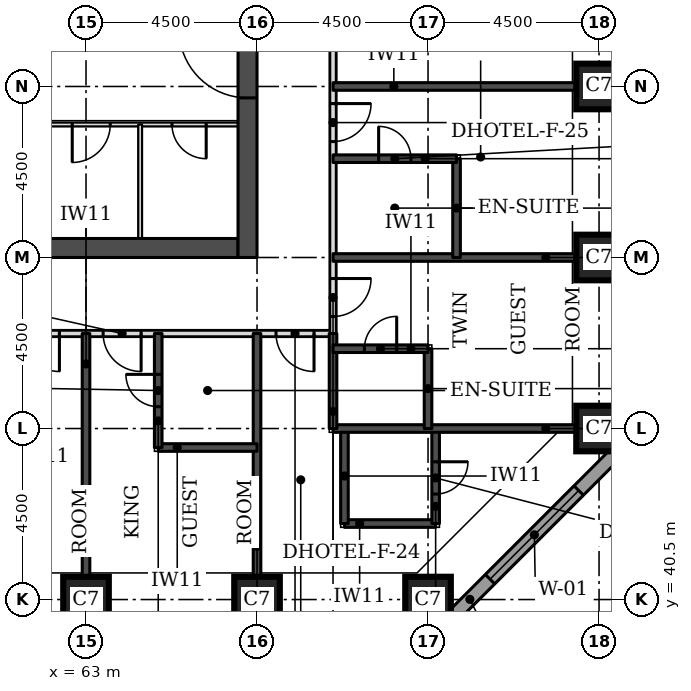
"""IFC4 building model, lengths in metres.
Left out: names, types, materials, properties, quantities, classifications, styles, units other than length and angle.
Written with IfcOpenShell. Run it as: python <this file> out.ifc"""

import sys

from ifc_helpers import new_model, si_unit, direction, frame, frame_2d, origin, origin_2d, place, context, subcontext, project, spatial, rectangle, extrude, element, fill, save


model = new_model("IFC4")
c1 = context("Model", 3, precision=1e-05, world=origin(), true_north=direction((0.0, 1.0)))
c2 = subcontext(c1, "Body", "Model", "MODEL_VIEW")
j1 = project(units=[si_unit("LENGTHUNIT", "METRE"), si_unit("PLANEANGLEUNIT", "RADIAN")], contexts=[c1])
p1 = place(None, origin())
s1 = spatial("IfcSite", under=j1, at=p1, CompositionType="ELEMENT")
p2 = place(p1, origin())
s2 = spatial("IfcBuilding", under=s1, at=p2, CompositionType="ELEMENT")
p3 = place(p2, frame((0.0, 0.0, 42.9)))
s3 = spatial("IfcBuildingStorey", under=s2, at=p3, CompositionType="ELEMENT", Elevation=42.9)
for number, where, z_axis, x_axis in (
    (1, (63.0, 40.5, 0.0), (0.0, 0.0, 1.0), (1.0, 0.0, 0.0)),
    (2, (67.5, 40.5, 0.0), (0.0, 0.0, 1.0), (1.0, 0.0, 0.0)),
    (3, (72.0, 40.5, 0.0), (0.0, 0.0, 1.0), (1.0, 0.0, 0.0)),
    (4, (76.5, 45.0, 0.0), (0.0, 0.0, 1.0), (1.0, 0.0, 0.0)),
    (5, (76.5, 49.5, 0.0), (0.0, 0.0, 1.0), (1.0, 0.0, 0.0)),
    (6, (76.5, 54.0, 0.0), (0.0, 0.0, 1.0), (1.0, 0.0, 0.0)),
):
    element("IfcColumn", number, at=place(p3, frame(where, z_axis=z_axis, x_axis=x_axis)), inside=s3, PredefinedType="COLUMN", context=c2, shape_type="SweptSolid", body=[
        extrude(rectangle(XDim=1.2, YDim=1.2, at=origin_2d()), origin(), (0.0, 0.0, 1.0), 3.3),
    ])
p4 = place(p3, frame((45.5, 49.75, 0.0), z_axis=(0.0, 0.0, 1.0), x_axis=(1.0, 0.0, 0.0)))
e7 = element("IfcWall", 7, at=p4, inside=s3, PredefinedType="SHEAR", context=c2, shape_type="SweptSolid", body=[
    extrude(rectangle(XDim=21.5, YDim=0.5, at=frame_2d((10.75, 0.0))), origin(), (0.0, 0.0, 1.0), 3.3),
])
p5 = place(p3, frame((67.25, 49.5, 0.0), z_axis=(0.0, 0.0, 1.0), x_axis=(0.0, 1.0, 0.0)))
e8 = element("IfcWall", 8, at=p5, inside=s3, PredefinedType="SHEAR", context=c2, shape_type="SweptSolid", body=[
    extrude(rectangle(XDim=22.5, YDim=0.5, at=frame_2d((11.25, 0.0))), origin(), (0.0, 0.0, 1.0), 3.3),
])
p6 = place(p5, frame((4.2, 0.0, 0.0)))
e9 = element("IfcOpeningElement", 9, at=p6, cuts=e8, PredefinedType="OPENING", context=c2, shape_type="SweptSolid", body=[
    extrude(rectangle(XDim=1.8, YDim=2.1, at=frame_2d((0.9, 1.05))), frame((0.0, 0.26, 0.0), z_axis=(0.0, -1.0, 0.0), x_axis=(1.0, 0.0, 0.0)), (0.0, 0.0, 1.0), 0.52),
])
p7 = place(p5, frame((6.9, 0.0, 0.0)))
e10 = element("IfcOpeningElement", 10, at=p7, cuts=e8, PredefinedType="OPENING", context=c2, shape_type="SweptSolid", body=[
    extrude(rectangle(XDim=1.1, YDim=2.1, at=frame_2d((0.55, 1.05))), frame((0.0, 0.26, 0.0), z_axis=(0.0, -1.0, 0.0), x_axis=(1.0, 0.0, 0.0)), (0.0, 0.0, 1.0), 0.52),
])
p8 = place(p5, frame((13.6, 0.0, 0.0)))
e11 = element("IfcOpeningElement", 11, at=p8, cuts=e8, PredefinedType="OPENING", context=c2, shape_type="SweptSolid", body=[
    extrude(rectangle(XDim=1.1, YDim=2.1, at=frame_2d((0.55, 1.05))), frame((0.0, 0.26, 0.0), z_axis=(0.0, -1.0, 0.0), x_axis=(1.0, 0.0, 0.0)), (0.0, 0.0, 1.0), 0.52),
])
p9 = place(p5, frame((16.5, 0.0, 0.0)))
e12 = element("IfcOpeningElement", 12, at=p9, cuts=e8, PredefinedType="OPENING", context=c2, shape_type="SweptSolid", body=[
    extrude(rectangle(XDim=1.8, YDim=2.1, at=frame_2d((0.9, 1.05))), frame((0.0, 0.26, 0.0), z_axis=(0.0, -1.0, 0.0), x_axis=(1.0, 0.0, 0.0)), (0.0, 0.0, 1.0), 0.52),
])
p10 = place(p3, frame((72.27, 39.674, 0.0), z_axis=(0.0, 0.0, 1.0), x_axis=(0.707106781187, 0.707106781187, 0.0)))
e13 = element("IfcWall", 13, at=p10, inside=s3, PredefinedType="STANDARD", context=c2, shape_type="SweptSolid", body=[
    extrude(rectangle(XDim=7.151, YDim=0.35, at=frame_2d((3.576, 0.0))), origin(), (0.0, 0.0, 1.0), 3.055),
])
p11 = place(p10, frame((1.926, 0.0, 0.8)))
e14 = element("IfcOpeningElement", 14, at=p11, cuts=e13, PredefinedType="OPENING", context=c2, shape_type="SweptSolid", body=[
    extrude(rectangle(XDim=3.3, YDim=1.5, at=frame_2d((1.65, 0.75))), frame((0.0, 0.185, 0.0), z_axis=(0.0, -1.0, 0.0), x_axis=(1.0, 0.0, 0.0)), (0.0, 0.0, 1.0), 0.37),
])
p12 = place(p3, frame((51.5, 47.5, 0.0), z_axis=(0.0, 0.0, 1.0), x_axis=(1.0, 0.0, 0.0)))
e15 = element("IfcWall", 15, at=p12, inside=s3, PredefinedType="PARTITIONING", context=c2, shape_type="SweptSolid", body=[
    extrude(rectangle(XDim=18.0, YDim=0.15, at=frame_2d((9.0, 0.0))), origin(), (0.0, 0.0, 1.0), 3.08),
])
p13 = place(p12, frame((11.95, 0.0, 0.0)))
e16 = element("IfcOpeningElement", 16, at=p13, cuts=e15, PredefinedType="OPENING", context=c2, shape_type="SweptSolid", body=[
    extrude(rectangle(XDim=1.0, YDim=2.1, at=frame_2d((0.5, 1.05))), frame((0.0, 0.085, 0.0), z_axis=(0.0, -1.0, 0.0), x_axis=(1.0, 0.0, 0.0)), (0.0, 0.0, 1.0), 0.17),
])
p14 = place(p12, frame((9.8, 0.0, 0.0)))
e17 = element("IfcOpeningElement", 17, at=p14, cuts=e15, PredefinedType="OPENING", context=c2, shape_type="SweptSolid", body=[
    extrude(rectangle(XDim=1.0, YDim=2.1, at=frame_2d((0.5, 1.05))), frame((0.0, 0.085, 0.0), z_axis=(0.0, -1.0, 0.0), x_axis=(1.0, 0.0, 0.0)), (0.0, 0.0, 1.0), 0.17),
])
p15 = place(p12, frame((16.5, 0.0, 0.0)))
e18 = element("IfcOpeningElement", 18, at=p15, cuts=e15, PredefinedType="OPENING", context=c2, shape_type="SweptSolid", body=[
    extrude(rectangle(XDim=1.0, YDim=2.1, at=frame_2d((0.5, 1.05))), frame((0.0, 0.085, 0.0), z_axis=(0.0, -1.0, 0.0), x_axis=(1.0, 0.0, 0.0)), (0.0, 0.0, 1.0), 0.17),
])
p16 = place(p3, frame((69.5, 47.5, 0.0), z_axis=(0.0, 0.0, 1.0), x_axis=(0.0, 1.0, 0.0)))
e19 = element("IfcWall", 19, at=p16, inside=s3, PredefinedType="PARTITIONING", context=c2, shape_type="SweptSolid", body=[
    extrude(rectangle(XDim=26.5, YDim=0.15, at=frame_2d((13.25, 0.0))), origin(), (0.0, 0.0, 1.0), 3.08),
])
p17 = place(p16, frame((25.053, 0.0, 0.0)))
e20 = element("IfcOpeningElement", 20, at=p17, cuts=e19, PredefinedType="OPENING", context=c2, shape_type="SweptSolid", body=[
    extrude(rectangle(XDim=1.0, YDim=2.1, at=frame_2d((0.5, 1.05))), frame((0.0, 0.085, 0.0), z_axis=(0.0, -1.0, 0.0), x_axis=(1.0, 0.0, 0.0)), (0.0, 0.0, 1.0), 0.17),
])
p18 = place(p16, frame((21.1, 0.0, 0.0)))
e21 = element("IfcOpeningElement", 21, at=p18, cuts=e19, PredefinedType="OPENING", context=c2, shape_type="SweptSolid", body=[
    extrude(rectangle(XDim=1.0, YDim=2.1, at=frame_2d((0.5, 1.05))), frame((0.0, 0.085, 0.0), z_axis=(0.0, -1.0, 0.0), x_axis=(1.0, 0.0, 0.0)), (0.0, 0.0, 1.0), 0.17),
])
p19 = place(p16, frame((8.75, 0.0, 0.0)))
e22 = element("IfcOpeningElement", 22, at=p19, cuts=e19, PredefinedType="OPENING", context=c2, shape_type="SweptSolid", body=[
    extrude(rectangle(XDim=1.1, YDim=2.1, at=frame_2d((0.55, 1.05))), frame((0.0, 0.085, 0.0), z_axis=(0.0, -1.0, 0.0), x_axis=(1.0, 0.0, 0.0)), (0.0, 0.0, 1.0), 0.17),
])
p20 = place(p16, frame((5.05, 0.0, 0.0)))
e23 = element("IfcOpeningElement", 23, at=p20, cuts=e19, PredefinedType="OPENING", context=c2, shape_type="SweptSolid", body=[
    extrude(rectangle(XDim=1.0, YDim=2.1, at=frame_2d((0.5, 1.05))), frame((0.0, 0.085, 0.0), z_axis=(0.0, -1.0, 0.0), x_axis=(1.0, 0.0, 0.0)), (0.0, 0.0, 1.0), 0.17),
])
p21 = place(p16, frame((0.447, 0.0, 0.0)))
e24 = element("IfcOpeningElement", 24, at=p21, cuts=e19, PredefinedType="OPENING", context=c2, shape_type="SweptSolid", body=[
    extrude(rectangle(XDim=1.0, YDim=2.1, at=frame_2d((0.5, 1.05))), frame((0.0, 0.085, 0.0), z_axis=(0.0, -1.0, 0.0), x_axis=(1.0, 0.0, 0.0)), (0.0, 0.0, 1.0), 0.17),
])
for number, where, z_axis, x_axis in (
    (25, (63.0, 41.1, 0.0), (0.0, 0.0, 1.0), (0.0, 1.0, 0.0)),
    (26, (67.5, 41.1, 0.0), (0.0, 0.0, 1.0), (0.0, 1.0, 0.0)),
):
    element("IfcWall", number, at=place(p3, frame(where, z_axis=z_axis, x_axis=x_axis)), inside=s3, PredefinedType="SOLIDWALL", context=c2, shape_type="SweptSolid", body=[
        extrude(rectangle(XDim=6.4, YDim=0.2, at=frame_2d((3.2, 0.0))), origin(), (0.0, 0.0, 1.0), 3.08),
    ])
p22 = place(p3, frame((69.8, 42.5, 0.0), z_axis=(0.0, 0.0, 1.0), x_axis=(1.0, 0.0, 0.0)))
e27 = element("IfcWall", 27, at=p22, inside=s3, PredefinedType="SOLIDWALL", context=c2, shape_type="SweptSolid", body=[
    extrude(rectangle(XDim=2.4, YDim=0.2, at=frame_2d((1.2, 0.0))), origin(), (0.0, 0.0, 1.0), 3.08),
])
p23 = place(p3, frame((69.8, 42.5, 0.0), z_axis=(0.0, 0.0, 1.0), x_axis=(0.0, 1.0, 0.0)))
e28 = element("IfcWall", 28, at=p23, inside=s3, PredefinedType="SOLIDWALL", context=c2, shape_type="SweptSolid", body=[
    extrude(rectangle(XDim=2.5, YDim=0.2, at=frame_2d((1.25, 0.0))), origin(), (0.0, 0.0, 1.0), 3.08),
])
p24 = place(p3, frame((72.2, 42.5, 0.0), z_axis=(0.0, 0.0, 1.0), x_axis=(0.0, 1.0, 0.0)))
e29 = element("IfcWall", 29, at=p24, inside=s3, PredefinedType="SOLIDWALL", context=c2, shape_type="SweptSolid", body=[
    extrude(rectangle(XDim=2.5, YDim=0.2, at=frame_2d((1.25, 0.0))), origin(), (0.0, 0.0, 1.0), 3.08),
])
p25 = place(p24, frame((0.775, 0.0, 0.0)))
e30 = element("IfcOpeningElement", 30, at=p25, cuts=e29, PredefinedType="OPENING", context=c2, shape_type="SweptSolid", body=[
    extrude(rectangle(XDim=0.85, YDim=2.1, at=frame_2d((0.425, 1.05))), frame((0.0, 0.11, 0.0), z_axis=(0.0, -1.0, 0.0), x_axis=(1.0, 0.0, 0.0)), (0.0, 0.0, 1.0), 0.22),
])
p26 = place(p3, frame((64.9, 44.5, 0.0), z_axis=(0.0, 0.0, 1.0), x_axis=(1.0, 0.0, 0.0)))
e31 = element("IfcWall", 31, at=p26, inside=s3, PredefinedType="SOLIDWALL", context=c2, shape_type="SweptSolid", body=[
    extrude(rectangle(XDim=2.6, YDim=0.2, at=frame_2d((1.3, 0.0))), origin(), (0.0, 0.0, 1.0), 3.08),
])
p27 = place(p3, frame((64.9, 44.5, 0.0), z_axis=(0.0, 0.0, 1.0), x_axis=(0.0, 1.0, 0.0)))
e32 = element("IfcWall", 32, at=p27, inside=s3, PredefinedType="SOLIDWALL", context=c2, shape_type="SweptSolid", body=[
    extrude(rectangle(XDim=3.0, YDim=0.2, at=frame_2d((1.5, 0.0))), origin(), (0.0, 0.0, 1.0), 3.08),
])
p28 = place(p27, frame((1.075, 0.0, 0.0)))
e33 = element("IfcOpeningElement", 33, at=p28, cuts=e32, PredefinedType="OPENING", context=c2, shape_type="SweptSolid", body=[
    extrude(rectangle(XDim=0.85, YDim=2.1, at=frame_2d((0.425, 1.05))), frame((0.0, 0.11, 0.0), z_axis=(0.0, -1.0, 0.0), x_axis=(1.0, 0.0, 0.0)), (0.0, 0.0, 1.0), 0.22),
])
p29 = place(p3, frame((69.5, 45.0, 0.0), z_axis=(0.0, 0.0, 1.0), x_axis=(1.0, 0.0, 0.0)))
e34 = element("IfcWall", 34, at=p29, inside=s3, PredefinedType="SOLIDWALL", context=c2, shape_type="SweptSolid", body=[
    extrude(rectangle(XDim=6.4, YDim=0.2, at=frame_2d((3.2, 0.0))), origin(), (0.0, 0.0, 1.0), 3.08),
])
p30 = place(p3, frame((69.5, 45.0, 0.0), z_axis=(0.0, 0.0, 1.0), x_axis=(0.0, 1.0, 0.0)))
e35 = element("IfcWall", 35, at=p30, inside=s3, PredefinedType="SOLIDWALL", context=c2, shape_type="SweptSolid", body=[
    extrude(rectangle(XDim=2.5, YDim=0.2, at=frame_2d((1.25, 0.0))), origin(), (0.0, 0.0, 1.0), 3.08),
])
p31 = place(p3, frame((72.0, 45.0, 0.0), z_axis=(0.0, 0.0, 1.0), x_axis=(0.0, 1.0, 0.0)))
e36 = element("IfcWall", 36, at=p31, inside=s3, PredefinedType="SOLIDWALL", context=c2, shape_type="SweptSolid", body=[
    extrude(rectangle(XDim=2.1, YDim=0.2, at=frame_2d((1.05, 0.0))), origin(), (0.0, 0.0, 1.0), 3.08),
])
p32 = place(p3, frame((69.5, 47.1, 0.0), z_axis=(0.0, 0.0, 1.0), x_axis=(1.0, 0.0, 0.0)))
e37 = element("IfcWall", 37, at=p32, inside=s3, PredefinedType="SOLIDWALL", context=c2, shape_type="SweptSolid", body=[
    extrude(rectangle(XDim=2.5, YDim=0.2, at=frame_2d((1.25, 0.0))), origin(), (0.0, 0.0, 1.0), 3.08),
])
p33 = place(p32, frame((0.825, 0.0, 0.0)))
e38 = element("IfcOpeningElement", 38, at=p33, cuts=e37, PredefinedType="OPENING", context=c2, shape_type="SweptSolid", body=[
    extrude(rectangle(XDim=0.85, YDim=2.1, at=frame_2d((0.425, 1.05))), frame((0.0, 0.11, 0.0), z_axis=(0.0, -1.0, 0.0), x_axis=(1.0, 0.0, 0.0)), (0.0, 0.0, 1.0), 0.22),
])
p34 = place(p3, frame((69.5, 49.5, 0.0), z_axis=(0.0, 0.0, 1.0), x_axis=(1.0, 0.0, 0.0)))
e39 = element("IfcWall", 39, at=p34, inside=s3, PredefinedType="SOLIDWALL", context=c2, shape_type="SweptSolid", body=[
    extrude(rectangle(XDim=6.4, YDim=0.2, at=frame_2d((3.2, 0.0))), origin(), (0.0, 0.0, 1.0), 3.08),
])
p35 = place(p3, frame((72.75, 49.5, 0.0), z_axis=(0.0, 0.0, 1.0), x_axis=(0.0, 1.0, 0.0)))
e40 = element("IfcWall", 40, at=p35, inside=s3, PredefinedType="SOLIDWALL", context=c2, shape_type="SweptSolid", body=[
    extrude(rectangle(XDim=2.6, YDim=0.2, at=frame_2d((1.3, 0.0))), origin(), (0.0, 0.0, 1.0), 3.08),
])
p36 = place(p3, frame((69.5, 52.1, 0.0), z_axis=(0.0, 0.0, 1.0), x_axis=(1.0, 0.0, 0.0)))
e41 = element("IfcWall", 41, at=p36, inside=s3, PredefinedType="SOLIDWALL", context=c2, shape_type="SweptSolid", body=[
    extrude(rectangle(XDim=3.25, YDim=0.2, at=frame_2d((1.625, 0.0))), origin(), (0.0, 0.0, 1.0), 3.08),
])
p37 = place(p36, frame((1.2, 0.0, 0.0)))
e42 = element("IfcOpeningElement", 42, at=p37, cuts=e41, PredefinedType="OPENING", context=c2, shape_type="SweptSolid", body=[
    extrude(rectangle(XDim=0.85, YDim=2.1, at=frame_2d((0.425, 1.05))), frame((0.0, 0.11, 0.0), z_axis=(0.0, -1.0, 0.0), x_axis=(1.0, 0.0, 0.0)), (0.0, 0.0, 1.0), 0.22),
])
p38 = place(p3, frame((69.5, 54.0, 0.0), z_axis=(0.0, 0.0, 1.0), x_axis=(1.0, 0.0, 0.0)))
e43 = element("IfcWall", 43, at=p38, inside=s3, PredefinedType="SOLIDWALL", context=c2, shape_type="SweptSolid", body=[
    extrude(rectangle(XDim=6.4, YDim=0.2, at=frame_2d((3.2, 0.0))), origin(), (0.0, 0.0, 1.0), 3.08),
])
p39 = place(p3, frame((61.85, 53.0, 0.0), z_axis=(0.0, 0.0, 1.0), x_axis=(1.0, 0.0, 0.0)))
e44 = element("IfcWall", 44, at=p39, inside=s3, PredefinedType="PARTITIONING", context=c2, shape_type="SweptSolid", body=[
    extrude(rectangle(XDim=5.15, YDim=0.1, at=frame_2d((2.575, 0.0))), origin(), (0.0, 0.0, 1.0), 3.08),
])
p40 = place(p39, frame((3.413, 0.0, 0.0)))
e45 = element("IfcOpeningElement", 45, at=p40, cuts=e44, PredefinedType="OPENING", context=c2, shape_type="SweptSolid", body=[
    extrude(rectangle(XDim=0.9, YDim=2.1, at=frame_2d((0.45, 1.05))), frame((0.0, 0.06, 0.0), z_axis=(0.0, -1.0, 0.0), x_axis=(1.0, 0.0, 0.0)), (0.0, 0.0, 1.0), 0.12),
])
p41 = place(p39, frame((0.788, 0.0, 0.0)))
e46 = element("IfcOpeningElement", 46, at=p41, cuts=e44, PredefinedType="OPENING", context=c2, shape_type="SweptSolid", body=[
    extrude(rectangle(XDim=1.0, YDim=2.1, at=frame_2d((0.5, 1.05))), frame((0.0, 0.06, 0.0), z_axis=(0.0, -1.0, 0.0), x_axis=(1.0, 0.0, 0.0)), (0.0, 0.0, 1.0), 0.12),
])
p42 = place(p3, frame((64.425, 50.0, 0.0), z_axis=(0.0, 0.0, 1.0), x_axis=(0.0, 1.0, 0.0)))
e47 = element("IfcWall", 47, at=p42, inside=s3, PredefinedType="PARTITIONING", context=c2, shape_type="SweptSolid", body=[
    extrude(rectangle(XDim=3.0, YDim=0.1, at=frame_2d((1.5, 0.0))), origin(), (0.0, 0.0, 1.0), 3.08),
])
p43 = place(p11, origin())
e48 = element("IfcWindow", 48, at=p43, inside=s3, PartitioningType="SINGLE_PANEL", PredefinedType="WINDOW", context=c2, shape_type="SweptSolid", body=[
    extrude(rectangle(XDim=3.3, YDim=1.5, at=frame_2d((1.65, 0.75))), frame((0.0, 0.085, 0.0), z_axis=(0.0, -1.0, 0.0), x_axis=(1.0, 0.0, 0.0)), (0.0, 0.0, 1.0), 0.06),
])
fill(e14, e48)
p44 = place(p20, frame((1.0, 0.0, 0.0), z_axis=(0.0, 0.0, 1.0), x_axis=(-1.0, 0.0, 0.0)))
e49 = element("IfcDoor", 49, at=p44, inside=s3, OperationType="SINGLE_SWING_LEFT", PredefinedType="DOOR", context=c2, shape_type="SweptSolid", body=[
    extrude(rectangle(XDim=1.0, YDim=2.1, at=frame_2d((0.5, 1.05))), frame((0.0, 0.025, 0.0), z_axis=(0.0, -1.0, 0.0), x_axis=(1.0, 0.0, 0.0)), (0.0, 0.0, 1.0), 0.05),
])
fill(e23, e49)
p45 = place(p37, origin())
e50 = element("IfcDoor", 50, at=p45, inside=s3, OperationType="SINGLE_SWING_LEFT", PredefinedType="DOOR", context=c2, shape_type="SweptSolid", body=[
    extrude(rectangle(XDim=0.85, YDim=2.1, at=frame_2d((0.425, 1.05))), frame((0.0, 0.025, 0.0), z_axis=(0.0, -1.0, 0.0), x_axis=(1.0, 0.0, 0.0)), (0.0, 0.0, 1.0), 0.05),
])
fill(e42, e50)
p46 = place(p21, frame((1.0, 0.0, 0.0), z_axis=(0.0, 0.0, 1.0), x_axis=(-1.0, 0.0, 0.0)))
e51 = element("IfcDoor", 51, at=p46, inside=s3, OperationType="SINGLE_SWING_LEFT", PredefinedType="DOOR", context=c2, shape_type="SweptSolid", body=[
    extrude(rectangle(XDim=1.0, YDim=2.1, at=frame_2d((0.5, 1.05))), frame((0.0, 0.025, 0.0), z_axis=(0.0, -1.0, 0.0), x_axis=(1.0, 0.0, 0.0)), (0.0, 0.0, 1.0), 0.05),
])
fill(e24, e51)
p47 = place(p33, origin())
e52 = element("IfcDoor", 52, at=p47, inside=s3, OperationType="SINGLE_SWING_RIGHT", PredefinedType="DOOR", context=c2, shape_type="SweptSolid", body=[
    extrude(rectangle(XDim=0.85, YDim=2.1, at=frame_2d((0.425, 1.05))), frame((0.0, 0.025, 0.0), z_axis=(0.0, -1.0, 0.0), x_axis=(1.0, 0.0, 0.0)), (0.0, 0.0, 1.0), 0.05),
])
fill(e38, e52)
p48 = place(p13, frame((1.0, 0.0, 0.0), z_axis=(0.0, 0.0, 1.0), x_axis=(-1.0, 0.0, 0.0)))
e53 = element("IfcDoor", 53, at=p48, inside=s3, OperationType="SINGLE_SWING_LEFT", PredefinedType="DOOR", context=c2, shape_type="SweptSolid", body=[
    extrude(rectangle(XDim=1.0, YDim=2.1, at=frame_2d((0.5, 1.05))), frame((0.0, 0.025, 0.0), z_axis=(0.0, -1.0, 0.0), x_axis=(1.0, 0.0, 0.0)), (0.0, 0.0, 1.0), 0.05),
])
fill(e16, e53)
p49 = place(p28, origin())
e54 = element("IfcDoor", 54, at=p49, inside=s3, OperationType="SINGLE_SWING_RIGHT", PredefinedType="DOOR", context=c2, shape_type="SweptSolid", body=[
    extrude(rectangle(XDim=0.85, YDim=2.1, at=frame_2d((0.425, 1.05))), frame((0.0, 0.025, 0.0), z_axis=(0.0, -1.0, 0.0), x_axis=(1.0, 0.0, 0.0)), (0.0, 0.0, 1.0), 0.05),
])
fill(e33, e54)
p50 = place(p14, frame((1.0, 0.0, 0.0), z_axis=(0.0, 0.0, 1.0), x_axis=(-1.0, 0.0, 0.0)))
e55 = element("IfcDoor", 55, at=p50, inside=s3, OperationType="SINGLE_SWING_LEFT", PredefinedType="DOOR", context=c2, shape_type="SweptSolid", body=[
    extrude(rectangle(XDim=1.0, YDim=2.1, at=frame_2d((0.5, 1.05))), frame((0.0, 0.025, 0.0), z_axis=(0.0, -1.0, 0.0), x_axis=(1.0, 0.0, 0.0)), (0.0, 0.0, 1.0), 0.05),
])
fill(e17, e55)
p51 = place(p15, frame((1.0, 0.0, 0.0), z_axis=(0.0, 0.0, 1.0), x_axis=(-1.0, 0.0, 0.0)))
e56 = element("IfcDoor", 56, at=p51, inside=s3, OperationType="SINGLE_SWING_LEFT", PredefinedType="DOOR", context=c2, shape_type="SweptSolid", body=[
    extrude(rectangle(XDim=1.0, YDim=2.1, at=frame_2d((0.5, 1.05))), frame((0.0, 0.025, 0.0), z_axis=(0.0, -1.0, 0.0), x_axis=(1.0, 0.0, 0.0)), (0.0, 0.0, 1.0), 0.05),
])
fill(e18, e56)
p52 = place(p25, frame((0.85, 0.0, 0.0), z_axis=(0.0, 0.0, 1.0), x_axis=(-1.0, 0.0, 0.0)))
e57 = element("IfcDoor", 57, at=p52, inside=s3, OperationType="SINGLE_SWING_LEFT", PredefinedType="DOOR", context=c2, shape_type="SweptSolid", body=[
    extrude(rectangle(XDim=0.85, YDim=2.1, at=frame_2d((0.425, 1.05))), frame((0.0, 0.025, 0.0), z_axis=(0.0, -1.0, 0.0), x_axis=(1.0, 0.0, 0.0)), (0.0, 0.0, 1.0), 0.05),
])
fill(e30, e57)
p53 = place(p6, origin())
e58 = element("IfcDoor", 58, at=p53, inside=s3, OperationType="SINGLE_SWING_RIGHT", PredefinedType="DOOR", context=c2, shape_type="SweptSolid", body=[
    extrude(rectangle(XDim=1.8, YDim=2.1, at=frame_2d((0.9, 1.05))), frame((0.0, 0.025, 0.0), z_axis=(0.0, -1.0, 0.0), x_axis=(1.0, 0.0, 0.0)), (0.0, 0.0, 1.0), 0.05),
])
fill(e9, e58)
p54 = place(p40, frame((0.9, 0.0, 0.0), z_axis=(0.0, 0.0, 1.0), x_axis=(-1.0, 0.0, 0.0)))
e59 = element("IfcDoor", 59, at=p54, inside=s3, OperationType="SINGLE_SWING_LEFT", PredefinedType="DOOR", context=c2, shape_type="SweptSolid", body=[
    extrude(rectangle(XDim=0.9, YDim=2.1, at=frame_2d((0.45, 1.05))), frame((0.0, 0.025, 0.0), z_axis=(0.0, -1.0, 0.0), x_axis=(1.0, 0.0, 0.0)), (0.0, 0.0, 1.0), 0.05),
])
fill(e45, e59)
p55 = place(p41, frame((1.0, 0.0, 0.0), z_axis=(0.0, 0.0, 1.0), x_axis=(-1.0, 0.0, 0.0)))
e60 = element("IfcDoor", 60, at=p55, inside=s3, OperationType="SINGLE_SWING_RIGHT", PredefinedType="DOOR", context=c2, shape_type="SweptSolid", body=[
    extrude(rectangle(XDim=1.0, YDim=2.1, at=frame_2d((0.5, 1.05))), frame((0.0, 0.025, 0.0), z_axis=(0.0, -1.0, 0.0), x_axis=(1.0, 0.0, 0.0)), (0.0, 0.0, 1.0), 0.05),
])
fill(e46, e60)
save(model, sys.argv[1])
